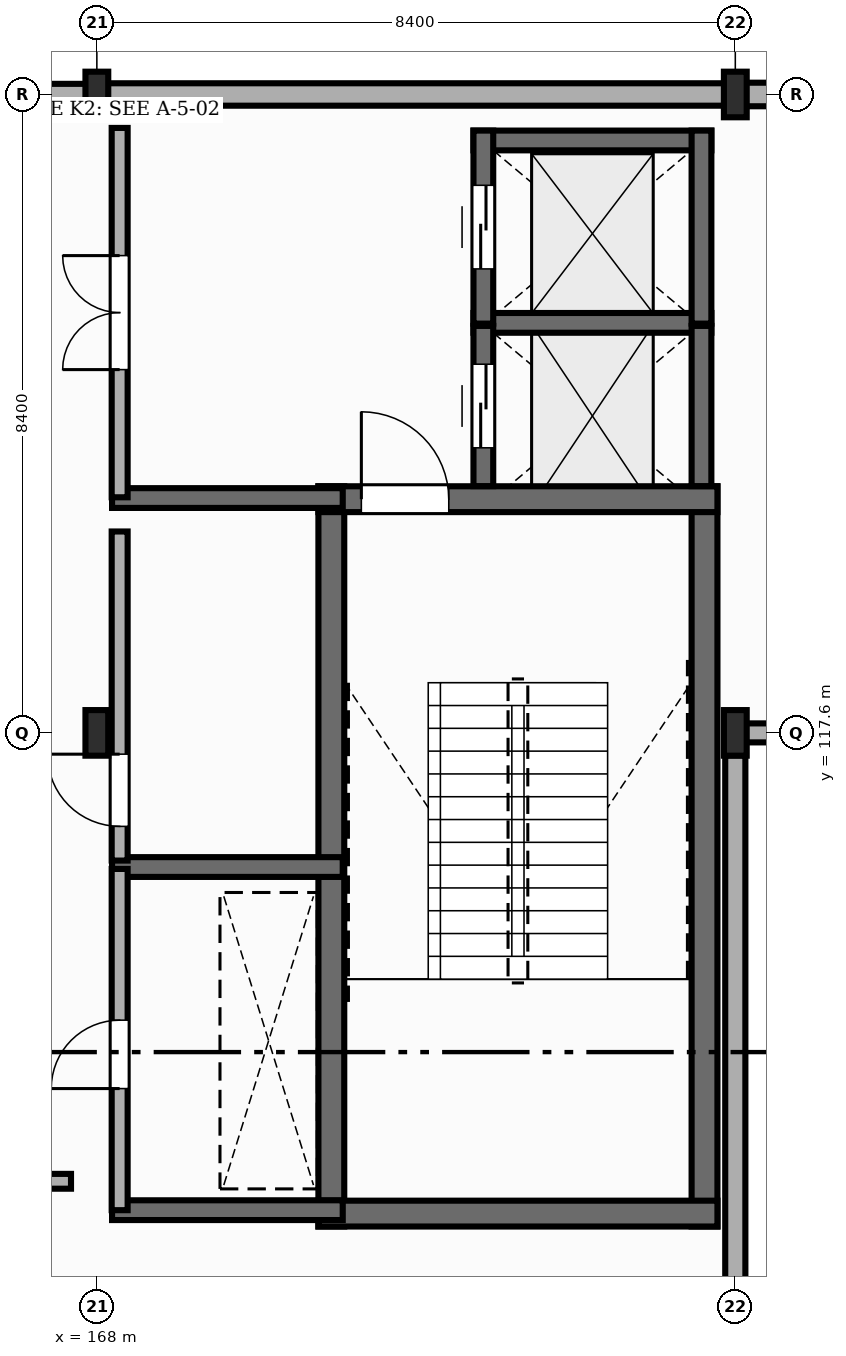
"""IFC4 building model, lengths in metres.
Left out: names, types, materials, properties, quantities, classifications, styles, units other than length and angle.
Written with IfcOpenShell. Run it as: python <this file> out.ifc"""

import sys

from ifc_helpers import new_model, si_unit, direction, frame, frame_2d, origin, origin_2d, place, context, subcontext, project, spatial, rectangle, i_section, extrude, element, fill, save


model = new_model("IFC4")
c1 = context("Model", 3, precision=1e-05, world=origin(), true_north=direction((0.0, 1.0)))
c2 = subcontext(c1, "Body", "Model", "MODEL_VIEW")
j1 = project(units=[si_unit("LENGTHUNIT", "METRE"), si_unit("PLANEANGLEUNIT", "RADIAN")], contexts=[c1])
p1 = place(None, origin())
s1 = spatial("IfcSite", under=j1, at=p1, CompositionType="ELEMENT")
p2 = place(p1, origin())
s2 = spatial("IfcBuilding", under=s1, at=p2, CompositionType="ELEMENT")
p3 = place(p2, frame((0.0, 0.0, 5.4)))
s3 = spatial("IfcBuildingStorey", under=s2, at=p3, CompositionType="ELEMENT", Elevation=5.4)
for number, where, z_axis, x_axis in (
    (1, (168.0, 117.6, 0.0), (0.0, 0.0, 1.0), (1.0, 0.0, 0.0)),
    (2, (168.0, 126.0, 0.0), (0.0, 0.0, 1.0), (1.0, 0.0, 0.0)),
    (3, (176.4, 117.6, 0.0), (0.0, 0.0, 1.0), (1.0, 0.0, 0.0)),
    (4, (176.4, 126.0, 0.0), (0.0, 0.0, 1.0), (1.0, 0.0, 0.0)),
):
    element("IfcColumn", number, at=place(p3, frame(where, z_axis=z_axis, x_axis=x_axis)), inside=s3, PredefinedType="COLUMN", context=c2, shape_type="SweptSolid", body=[
        extrude(i_section(OverallWidth=0.3, OverallDepth=0.6, WebThickness=0.015, FlangeThickness=0.03, FilletRadius=0.027, at=origin_2d()), origin(), (0.0, 0.0, 1.0), 4.5),
    ])
p4 = place(p3, frame((176.4, 109.496, 0.0), z_axis=(0.0, 0.0, 1.0), x_axis=(0.0, 1.0, 0.0)))
e5 = element("IfcWall", 5, at=p4, inside=s3, PredefinedType="STANDARD", context=c2, shape_type="SweptSolid", body=[
    extrude(rectangle(XDim=7.808, YDim=0.265, at=frame_2d((3.904, 0.0))), origin(), (0.0, 0.0, 1.0), 3.922),
])
p5 = place(p3, frame((176.408, 117.6, 0.0), z_axis=(0.0, 0.0, 1.0), x_axis=(1.0, 0.0, 0.0)))
e6 = element("IfcWall", 6, at=p5, inside=s3, PredefinedType="STANDARD", context=c2, shape_type="SweptSolid", body=[
    extrude(rectangle(XDim=8.384, YDim=0.25, at=frame_2d((4.192, 0.0))), origin(), (0.0, 0.0, 1.0), 3.952),
])
p6 = place(p3, frame((184.792, 126.0, 0.0), z_axis=(0.0, 0.0, 1.0), x_axis=(-1.0, 0.0, 0.0)))
e7 = element("IfcWall", 7, at=p6, inside=s3, PredefinedType="STANDARD", context=c2, shape_type="SweptSolid", body=[
    extrude(rectangle(XDim=8.384, YDim=0.31, at=frame_2d((4.192, 0.0))), origin(), (0.0, 0.0, 1.0), 3.922),
])
p7 = place(p3, frame((176.392, 126.0, 0.0), z_axis=(0.0, 0.0, 1.0), x_axis=(-1.0, 0.0, 0.0)))
e8 = element("IfcWall", 8, at=p7, inside=s3, PredefinedType="STANDARD", context=c2, shape_type="SweptSolid", body=[
    extrude(rectangle(XDim=8.384, YDim=0.295, at=frame_2d((4.192, 0.0))), origin(), (0.0, 0.0, 1.0), 3.952),
])
p8 = place(p3, frame((167.992, 126.0, 0.0), z_axis=(0.0, 0.0, 1.0), x_axis=(-1.0, 0.0, 0.0)))
e9 = element("IfcWall", 9, at=p8, inside=s3, PredefinedType="STANDARD", context=c2, shape_type="SweptSolid", body=[
    extrude(rectangle(XDim=8.384, YDim=0.28, at=frame_2d((4.192, 0.0))), origin(), (0.0, 0.0, 1.0), 3.922),
])
for number, where, z_axis, x_axis in (
    (10, (171.085, 111.105, 0.0), (0.0, 0.0, 1.0), (0.0, 1.0, 0.0)),
    (11, (175.995, 111.105, 0.0), (0.0, 0.0, 1.0), (0.0, 1.0, 0.0)),
):
    element("IfcWall", number, at=place(p3, frame(where, z_axis=z_axis, x_axis=x_axis)), inside=s3, PredefinedType="SHEAR", context=c2, shape_type="SweptSolid", body=[
        extrude(rectangle(XDim=9.74, YDim=0.34, at=frame_2d((4.87, 0.0))), origin(), (0.0, 0.0, 1.0), 4.29),
    ])
p9 = place(p3, frame((170.915, 111.275, 0.0), z_axis=(0.0, 0.0, 1.0), x_axis=(1.0, 0.0, 0.0)))
e12 = element("IfcWall", 12, at=p9, inside=s3, PredefinedType="SHEAR", context=c2, shape_type="SweptSolid", body=[
    extrude(rectangle(XDim=5.25, YDim=0.34, at=frame_2d((2.625, 0.0))), origin(), (0.0, 0.0, 1.0), 4.29),
])
p10 = place(p3, frame((170.915, 120.675, 0.0), z_axis=(0.0, 0.0, 1.0), x_axis=(1.0, 0.0, 0.0)))
e13 = element("IfcWall", 13, at=p10, inside=s3, PredefinedType="SHEAR", context=c2, shape_type="SweptSolid", body=[
    extrude(rectangle(XDim=5.25, YDim=0.34, at=frame_2d((2.625, 0.0))), origin(), (0.0, 0.0, 1.0), 4.29),
])
p11 = place(p10, frame((0.565, 0.0, 0.0)))
e14 = element("IfcOpeningElement", 14, at=p11, cuts=e13, PredefinedType="OPENING", context=c2, shape_type="SweptSolid", body=[
    extrude(rectangle(XDim=1.15, YDim=2.15, at=frame_2d((0.575, 1.075))), frame((0.0, 0.18, 0.0), z_axis=(0.0, -1.0, 0.0), x_axis=(1.0, 0.0, 0.0)), (0.0, 0.0, 1.0), 0.36),
])
p12 = place(p3, frame((172.955, 122.995, 0.0), z_axis=(0.0, 0.0, 1.0), x_axis=(1.0, 0.0, 0.0)))
e15 = element("IfcWall", 15, at=p12, inside=s3, PredefinedType="SHEAR", context=c2, shape_type="SweptSolid", body=[
    extrude(rectangle(XDim=3.13, YDim=0.26, at=frame_2d((1.565, 0.0))), origin(), (0.0, 0.0, 1.0), 4.29),
])
p13 = place(p3, frame((175.955, 120.847, 0.0), z_axis=(0.0, 0.0, 1.0), x_axis=(0.0, 1.0, 0.0)))
e16 = element("IfcWall", 16, at=p13, inside=s3, PredefinedType="SHEAR", context=c2, shape_type="SweptSolid", body=[
    extrude(rectangle(XDim=2.108, YDim=0.26, at=frame_2d((1.054, 0.0))), origin(), (0.0, 0.0, 1.0), 4.29),
])
p14 = place(p3, frame((173.085, 120.847, 0.0), z_axis=(0.0, 0.0, 1.0), x_axis=(0.0, 1.0, 0.0)))
e17 = element("IfcWall", 17, at=p14, inside=s3, PredefinedType="SHEAR", context=c2, shape_type="SweptSolid", body=[
    extrude(rectangle(XDim=2.108, YDim=0.26, at=frame_2d((1.054, 0.0))), origin(), (0.0, 0.0, 1.0), 4.29),
])
p15 = place(p14, frame((0.504, 0.0, 0.0)))
e18 = element("IfcOpeningElement", 18, at=p15, cuts=e17, PredefinedType="OPENING", context=c2, shape_type="SweptSolid", body=[
    extrude(rectangle(XDim=1.1, YDim=2.15, at=frame_2d((0.55, 1.075))), frame((0.0, 0.14, 0.0), z_axis=(0.0, -1.0, 0.0), x_axis=(1.0, 0.0, 0.0)), (0.0, 0.0, 1.0), 0.28),
])
p16 = place(p3, frame((172.955, 125.395, 0.0), z_axis=(0.0, 0.0, 1.0), x_axis=(1.0, 0.0, 0.0)))
e19 = element("IfcWall", 19, at=p16, inside=s3, PredefinedType="SHEAR", context=c2, shape_type="SweptSolid", body=[
    extrude(rectangle(XDim=3.13, YDim=0.26, at=frame_2d((1.565, 0.0))), origin(), (0.0, 0.0, 1.0), 4.29),
])
p17 = place(p3, frame((175.955, 122.985, 0.0), z_axis=(0.0, 0.0, 1.0), x_axis=(0.0, 1.0, 0.0)))
e20 = element("IfcWall", 20, at=p17, inside=s3, PredefinedType="SHEAR", context=c2, shape_type="SweptSolid", body=[
    extrude(rectangle(XDim=2.54, YDim=0.26, at=frame_2d((1.27, 0.0))), origin(), (0.0, 0.0, 1.0), 4.29),
])
p18 = place(p3, frame((173.085, 122.985, 0.0), z_axis=(0.0, 0.0, 1.0), x_axis=(0.0, 1.0, 0.0)))
e21 = element("IfcWall", 21, at=p18, inside=s3, PredefinedType="SHEAR", context=c2, shape_type="SweptSolid", body=[
    extrude(rectangle(XDim=2.54, YDim=0.26, at=frame_2d((1.27, 0.0))), origin(), (0.0, 0.0, 1.0), 4.29),
])
p19 = place(p18, frame((0.72, 0.0, 0.0)))
e22 = element("IfcOpeningElement", 22, at=p19, cuts=e21, PredefinedType="OPENING", context=c2, shape_type="SweptSolid", body=[
    extrude(rectangle(XDim=1.1, YDim=2.15, at=frame_2d((0.55, 1.075))), frame((0.0, 0.14, 0.0), z_axis=(0.0, -1.0, 0.0), x_axis=(1.0, 0.0, 0.0)), (0.0, 0.0, 1.0), 0.28),
])
for number, where, z_axis, x_axis in (
    (23, (168.2, 111.32, 0.0), (0.0, 0.0, 1.0), (1.0, 0.0, 0.0)),
    (24, (168.2, 115.835, 0.0), (0.0, 0.0, 1.0), (1.0, 0.0, 0.0)),
    (25, (168.2, 120.69, 0.0), (0.0, 0.0, 1.0), (1.0, 0.0, 0.0)),
):
    element("IfcWall", number, at=place(p3, frame(where, z_axis=z_axis, x_axis=x_axis)), inside=s3, PredefinedType="SHEAR", context=c2, shape_type="SweptSolid", body=[
        extrude(rectangle(XDim=3.035, YDim=0.26, at=frame_2d((1.518, 0.0))), origin(), (0.0, 0.0, 1.0), 4.29),
    ])
p20 = place(p3, frame((168.3, 111.32, 0.0), z_axis=(0.0, 0.0, 1.0), x_axis=(0.0, 1.0, 0.0)))
e26 = element("IfcWall", 26, at=p20, inside=s3, PredefinedType="STANDARD", context=c2, shape_type="SweptSolid", body=[
    extrude(rectangle(XDim=4.49, YDim=0.21, at=frame_2d((2.245, 0.0))), origin(), (0.0, 0.0, 1.0), 3.792),
])
p21 = place(p20, frame((1.6, 0.0, 0.0)))
e27 = element("IfcOpeningElement", 27, at=p21, cuts=e26, PredefinedType="OPENING", context=c2, shape_type="SweptSolid", body=[
    extrude(rectangle(XDim=0.9, YDim=2.1, at=frame_2d((0.45, 1.05))), frame((0.0, 0.115, 0.0), z_axis=(0.0, -1.0, 0.0), x_axis=(1.0, 0.0, 0.0)), (0.0, 0.0, 1.0), 0.23),
])
p22 = place(p3, frame((168.3, 115.92, 0.0), z_axis=(0.0, 0.0, 1.0), x_axis=(0.0, 1.0, 0.0)))
e28 = element("IfcWall", 28, at=p22, inside=s3, PredefinedType="STANDARD", context=c2, shape_type="SweptSolid", body=[
    extrude(rectangle(XDim=4.33, YDim=0.21, at=frame_2d((2.165, 0.0))), origin(), (0.0, 0.0, 1.0), 3.792),
])
p23 = place(p22, frame((0.45, 0.0, 0.0)))
e29 = element("IfcOpeningElement", 29, at=p23, cuts=e28, PredefinedType="OPENING", context=c2, shape_type="SweptSolid", body=[
    extrude(rectangle(XDim=0.95, YDim=2.15, at=frame_2d((0.475, 1.075))), frame((0.0, 0.115, 0.0), z_axis=(0.0, -1.0, 0.0), x_axis=(1.0, 0.0, 0.0)), (0.0, 0.0, 1.0), 0.23),
])
p24 = place(p3, frame((168.3, 120.7, 0.0), z_axis=(0.0, 0.0, 1.0), x_axis=(0.0, 1.0, 0.0)))
e30 = element("IfcWall", 30, at=p24, inside=s3, PredefinedType="STANDARD", context=c2, shape_type="SweptSolid", body=[
    extrude(rectangle(XDim=4.86, YDim=0.21, at=frame_2d((2.43, 0.0))), origin(), (0.0, 0.0, 1.0), 3.882),
])
p25 = place(p24, frame((1.68, 0.0, 0.0)))
e31 = element("IfcOpeningElement", 31, at=p25, cuts=e30, PredefinedType="OPENING", context=c2, shape_type="SweptSolid", body=[
    extrude(rectangle(XDim=1.5, YDim=2.2, at=frame_2d((0.75, 1.1))), frame((0.0, 0.115, 0.0), z_axis=(0.0, -1.0, 0.0), x_axis=(1.0, 0.0, 0.0)), (0.0, 0.0, 1.0), 0.23),
])
p26 = place(p3, frame((165.1, 111.7, -0.004), z_axis=(0.0, 0.0, 1.0), x_axis=(1.0, 0.0, 0.0)))
e32 = element("IfcWall", 32, at=p26, inside=s3, PredefinedType="STANDARD", context=c2, shape_type="SweptSolid", body=[
    extrude(rectangle(XDim=2.56, YDim=0.195, at=frame_2d((1.28, 0.0))), origin(), (0.0, 0.0, 1.0), 4.294),
])
p27 = place(p11, origin())
e33 = element("IfcDoor", 33, at=p27, inside=s3, OperationType="SINGLE_SWING_LEFT", PredefinedType="DOOR", context=c2, shape_type="SweptSolid", body=[
    extrude(rectangle(XDim=1.15, YDim=2.15, at=frame_2d((0.575, 1.075))), frame((0.0, 0.025, 0.0), z_axis=(0.0, -1.0, 0.0), x_axis=(1.0, 0.0, 0.0)), (0.0, 0.0, 1.0), 0.05),
])
fill(e14, e33)
p28 = place(p15, origin())
e34 = element("IfcDoor", 34, at=p28, inside=s3, OperationType="DOUBLE_DOOR_SLIDING", PredefinedType="DOOR", context=c2, shape_type="SweptSolid", body=[
    extrude(rectangle(XDim=1.1, YDim=2.15, at=frame_2d((0.55, 1.075))), frame((0.0, 0.025, 0.0), z_axis=(0.0, -1.0, 0.0), x_axis=(1.0, 0.0, 0.0)), (0.0, 0.0, 1.0), 0.05),
])
fill(e18, e34)
p29 = place(p19, origin())
e35 = element("IfcDoor", 35, at=p29, inside=s3, OperationType="DOUBLE_DOOR_SLIDING", PredefinedType="DOOR", context=c2, shape_type="SweptSolid", body=[
    extrude(rectangle(XDim=1.1, YDim=2.15, at=frame_2d((0.55, 1.075))), frame((0.0, 0.025, 0.0), z_axis=(0.0, -1.0, 0.0), x_axis=(1.0, 0.0, 0.0)), (0.0, 0.0, 1.0), 0.05),
])
fill(e22, e35)
p30 = place(p21, origin())
e36 = element("IfcDoor", 36, at=p30, inside=s3, OperationType="SINGLE_SWING_LEFT", PredefinedType="DOOR", context=c2, shape_type="SweptSolid", body=[
    extrude(rectangle(XDim=0.9, YDim=2.1, at=frame_2d((0.45, 1.05))), frame((0.0, 0.025, 0.0), z_axis=(0.0, -1.0, 0.0), x_axis=(1.0, 0.0, 0.0)), (0.0, 0.0, 1.0), 0.05),
])
fill(e27, e36)
p31 = place(p23, origin())
e37 = element("IfcDoor", 37, at=p31, inside=s3, OperationType="SINGLE_SWING_RIGHT", PredefinedType="DOOR", context=c2, shape_type="SweptSolid", body=[
    extrude(rectangle(XDim=0.95, YDim=2.15, at=frame_2d((0.475, 1.075))), frame((0.0, 0.025, 0.0), z_axis=(0.0, -1.0, 0.0), x_axis=(1.0, 0.0, 0.0)), (0.0, 0.0, 1.0), 0.05),
])
fill(e29, e37)
p32 = place(p25, origin())
e38 = element("IfcDoor", 38, at=p32, inside=s3, OperationType="DOUBLE_DOOR_SINGLE_SWING", PredefinedType="DOOR", context=c2, shape_type="SweptSolid", body=[
    extrude(rectangle(XDim=1.5, YDim=2.2, at=frame_2d((0.75, 1.1))), frame((0.0, 0.025, 0.0), z_axis=(0.0, -1.0, 0.0), x_axis=(1.0, 0.0, 0.0)), (0.0, 0.0, 1.0), 0.05),
])
fill(e31, e38)
save(model, sys.argv[1])
